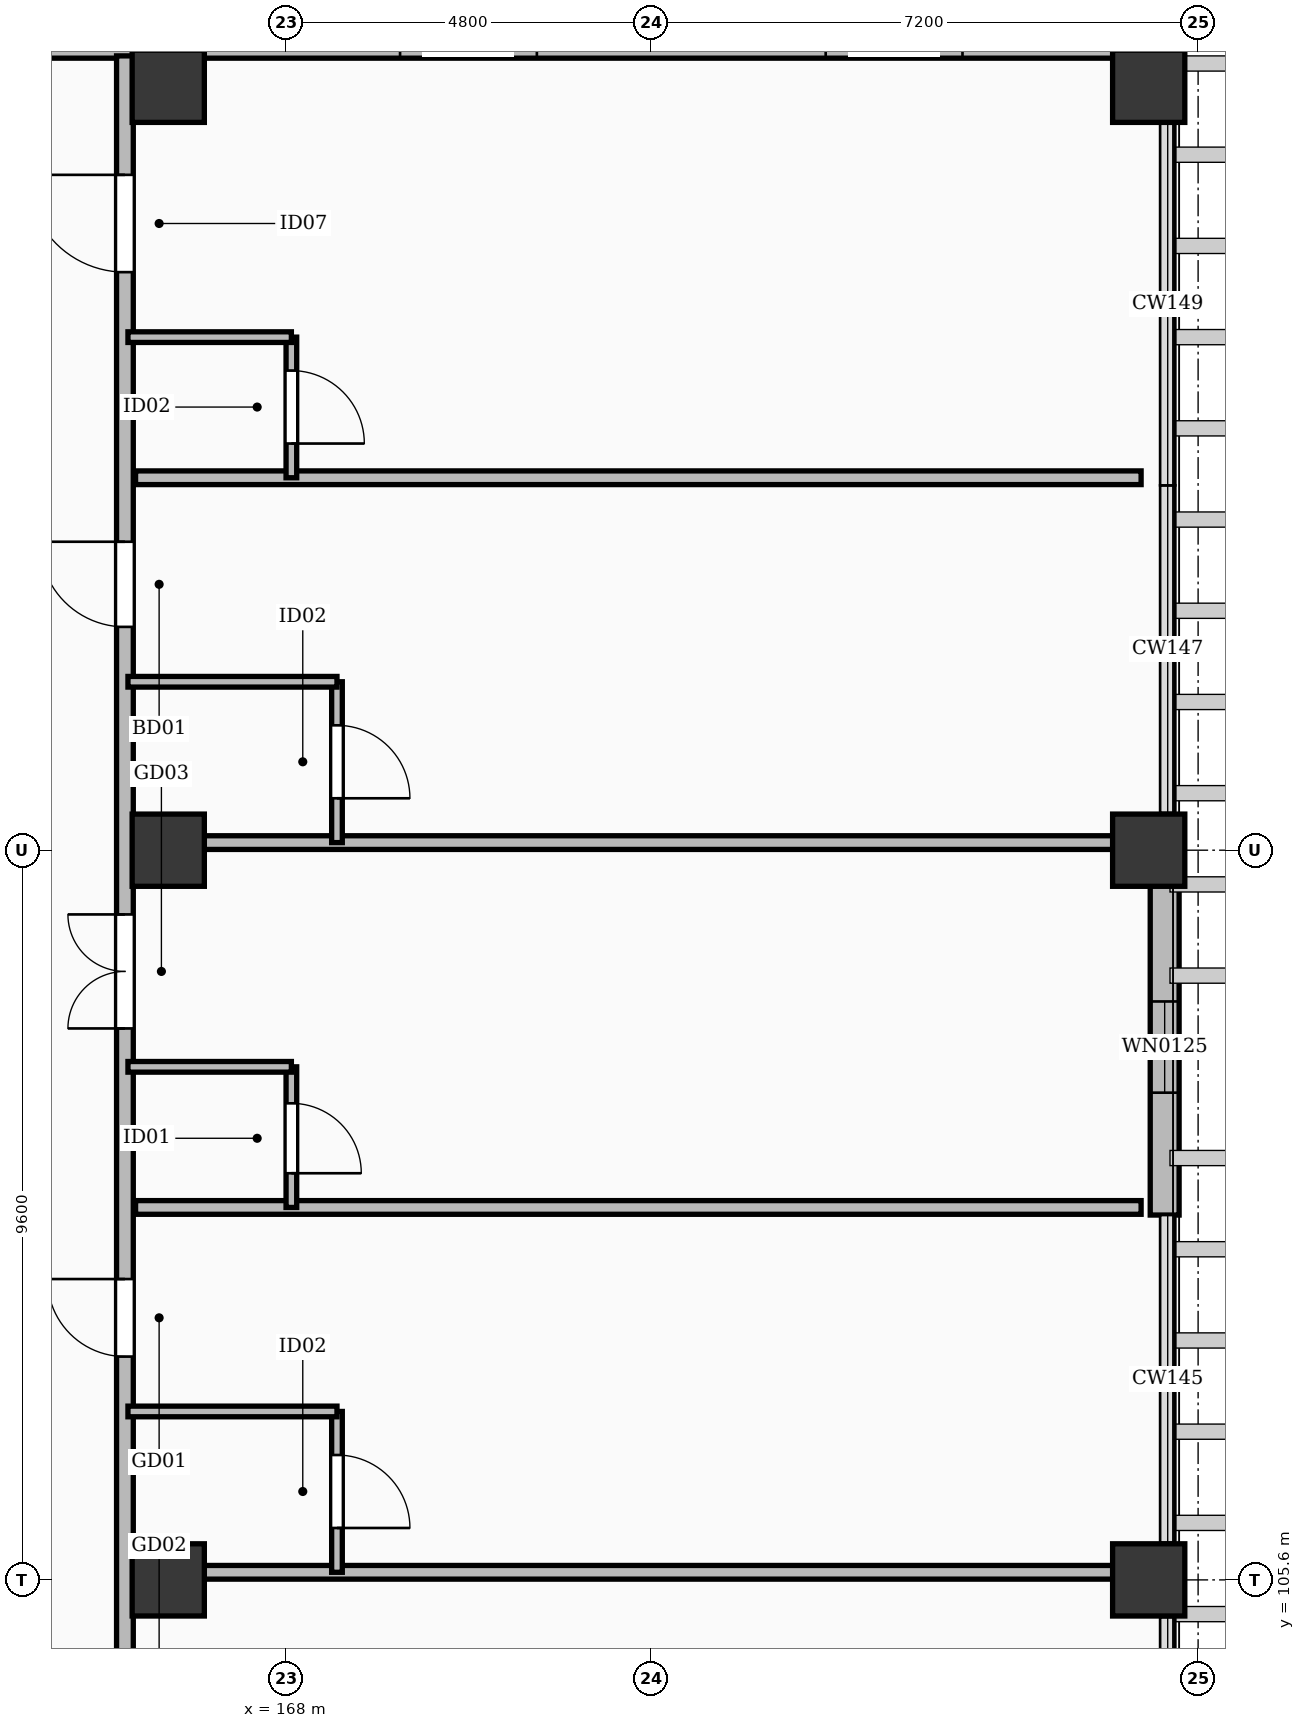
"""IFC4 building model, lengths in metres.
Left out: names, types, materials, properties, quantities, classifications, styles, units other than length and angle.
Written with IfcOpenShell. Run it as: python <this file> out.ifc"""

import sys

from ifc_helpers import new_model, si_unit, direction, frame, frame_2d, origin, origin_2d, place, context, subcontext, project, spatial, rectangle, extrude, element, fill, save


model = new_model("IFC4")
c1 = context("Model", 3, precision=1e-05, world=origin(), true_north=direction((0.0, 1.0)))
c2 = subcontext(c1, "Body", "Model", "MODEL_VIEW")
j1 = project(units=[si_unit("LENGTHUNIT", "METRE"), si_unit("PLANEANGLEUNIT", "RADIAN")], contexts=[c1])
p1 = place(None, origin())
s1 = spatial("IfcSite", under=j1, at=p1, CompositionType="ELEMENT")
p2 = place(p1, origin())
s2 = spatial("IfcBuilding", under=s1, at=p2, CompositionType="ELEMENT")
p3 = place(p2, frame((0.0, 0.0, 11.4)))
s3 = spatial("IfcBuildingStorey", under=s2, at=p3, CompositionType="ELEMENT", Elevation=11.4)
for number, where, z_axis, x_axis in (
    (1, (166.45, 105.6, 0.0), (0.0, 0.0, 1.0), (1.0, 0.0, 0.0)),
    (2, (166.45, 115.2, 0.0), (0.0, 0.0, 1.0), (1.0, 0.0, 0.0)),
    (3, (166.45, 125.25, 0.0), (0.0, 0.0, 1.0), (1.0, 0.0, 0.0)),
    (4, (179.35, 105.6, 0.0), (0.0, 0.0, 1.0), (1.0, 0.0, 0.0)),
    (5, (179.35, 115.2, 0.0), (0.0, 0.0, 1.0), (1.0, 0.0, 0.0)),
    (6, (179.35, 125.25, 0.0), (0.0, 0.0, 1.0), (1.0, 0.0, 0.0)),
):
    element("IfcColumn", number, at=place(p3, frame(where, z_axis=z_axis, x_axis=x_axis)), inside=s3, PredefinedType="COLUMN", context=c2, shape_type="SweptSolid", body=[
        extrude(rectangle(XDim=0.95, YDim=0.95, at=origin_2d()), origin(), (0.0, 0.0, 1.0), 4.8),
    ])
p4 = place(p3, frame((149.9, 125.81, 0.0), z_axis=(0.0, 0.0, 1.0), x_axis=(1.0, 0.0, 0.0)))
e7 = element("IfcWall", 7, at=p4, inside=s3, PredefinedType="SOLIDWALL", context=c2, shape_type="SweptSolid", body=[
    extrude(rectangle(XDim=29.0, YDim=0.38, at=frame_2d((14.5, 0.0))), origin(), (0.0, 0.0, 1.0), 4.42),
])
p5 = place(p4, frame((3.6, 0.0, 0.55)))
e8 = element("IfcOpeningElement", 8, at=p5, cuts=e7, PredefinedType="OPENING", context=c2, shape_type="SweptSolid", body=[
    extrude(rectangle(XDim=1.8, YDim=1.76, at=frame_2d((0.9, 0.88))), frame((0.0, 0.202, 0.0), z_axis=(0.0, -1.0, 0.0), x_axis=(1.0, 0.0, 0.0)), (0.0, 0.0, 1.0), 0.404),
])
p6 = place(p4, frame((9.2, 0.0, 0.55)))
e9 = element("IfcOpeningElement", 9, at=p6, cuts=e7, PredefinedType="OPENING", context=c2, shape_type="SweptSolid", body=[
    extrude(rectangle(XDim=1.8, YDim=1.76, at=frame_2d((0.9, 0.88))), frame((0.0, 0.202, 0.0), z_axis=(0.0, -1.0, 0.0), x_axis=(1.0, 0.0, 0.0)), (0.0, 0.0, 1.0), 0.404),
])
p7 = place(p4, frame((19.6, 0.0, 0.55)))
e10 = element("IfcOpeningElement", 10, at=p7, cuts=e7, PredefinedType="OPENING", context=c2, shape_type="SweptSolid", body=[
    extrude(rectangle(XDim=1.8, YDim=1.76, at=frame_2d((0.9, 0.88))), frame((0.0, 0.202, 0.0), z_axis=(0.0, -1.0, 0.0), x_axis=(1.0, 0.0, 0.0)), (0.0, 0.0, 1.0), 0.404),
])
p8 = place(p4, frame((25.2, 0.0, 0.55)))
e11 = element("IfcOpeningElement", 11, at=p8, cuts=e7, PredefinedType="OPENING", context=c2, shape_type="SweptSolid", body=[
    extrude(rectangle(XDim=1.8, YDim=1.76, at=frame_2d((0.9, 0.88))), frame((0.0, 0.202, 0.0), z_axis=(0.0, -1.0, 0.0), x_axis=(1.0, 0.0, 0.0)), (0.0, 0.0, 1.0), 0.404),
])
p9 = place(p3, frame((179.56, 114.75, 0.0), z_axis=(0.0, 0.0, 1.0), x_axis=(0.0, -1.0, 0.0)))
e12 = element("IfcWall", 12, at=p9, inside=s3, PredefinedType="SOLIDWALL", context=c2, shape_type="SweptSolid", body=[
    extrude(rectangle(XDim=4.35, YDim=0.38, at=frame_2d((2.175, 0.0))), origin(), (0.0, 0.0, 1.0), 3.662),
])
p10 = place(p9, frame((1.54, 0.0, 0.55)))
e13 = element("IfcOpeningElement", 13, at=p10, cuts=e12, PredefinedType="OPENING", context=c2, shape_type="SweptSolid", body=[
    extrude(rectangle(XDim=1.2, YDim=1.72, at=frame_2d((0.6, 0.86))), frame((0.0, 0.202, 0.0), z_axis=(0.0, -1.0, 0.0), x_axis=(1.0, 0.0, 0.0)), (0.0, 0.0, 1.0), 0.404),
])
p11 = place(p3, frame((165.88, 65.4, 0.0), z_axis=(0.0, 0.0, 1.0), x_axis=(0.0, 1.0, 0.0)))
e14 = element("IfcWall", 14, at=p11, inside=s3, PredefinedType="PARTITIONING", context=c2, shape_type="SweptSolid", body=[
    extrude(rectangle(XDim=60.25, YDim=0.22, at=frame_2d((30.125, 0.0))), origin(), (0.0, 0.0, 1.0), 3.662),
])
p12 = place(p11, frame((4.738, 0.0, 0.0)))
e15 = element("IfcOpeningElement", 15, at=p12, cuts=e14, PredefinedType="OPENING", context=c2, shape_type="SweptSolid", body=[
    extrude(rectangle(XDim=1.05, YDim=2.18, at=frame_2d((0.525, 1.09))), frame((0.0, 0.122, 0.0), z_axis=(0.0, -1.0, 0.0), x_axis=(1.0, 0.0, 0.0)), (0.0, 0.0, 1.0), 0.244),
])
p13 = place(p11, frame((9.405, 0.0, 0.0)))
e16 = element("IfcOpeningElement", 16, at=p13, cuts=e14, PredefinedType="OPENING", context=c2, shape_type="SweptSolid", body=[
    extrude(rectangle(XDim=1.08, YDim=2.25, at=frame_2d((0.54, 1.125))), frame((0.0, 0.122, 0.0), z_axis=(0.0, -1.0, 0.0), x_axis=(1.0, 0.0, 0.0)), (0.0, 0.0, 1.0), 0.244),
])
p14 = place(p11, frame((14.338, 0.0, 0.0)))
e17 = element("IfcOpeningElement", 17, at=p14, cuts=e14, PredefinedType="OPENING", context=c2, shape_type="SweptSolid", body=[
    extrude(rectangle(XDim=1.02, YDim=2.2, at=frame_2d((0.51, 1.1))), frame((0.0, 0.122, 0.0), z_axis=(0.0, -1.0, 0.0), x_axis=(1.0, 0.0, 0.0)), (0.0, 0.0, 1.0), 0.244),
])
p15 = place(p11, frame((18.655, 0.0, 0.0)))
e18 = element("IfcOpeningElement", 18, at=p15, cuts=e14, PredefinedType="OPENING", context=c2, shape_type="SweptSolid", body=[
    extrude(rectangle(XDim=1.5, YDim=2.3, at=frame_2d((0.75, 1.15))), frame((0.0, 0.122, 0.0), z_axis=(0.0, -1.0, 0.0), x_axis=(1.0, 0.0, 0.0)), (0.0, 0.0, 1.0), 0.244),
])
p16 = place(p11, frame((23.938, 0.0, 0.0)))
e19 = element("IfcOpeningElement", 19, at=p16, cuts=e14, PredefinedType="OPENING", context=c2, shape_type="SweptSolid", body=[
    extrude(rectangle(XDim=1.12, YDim=2.15, at=frame_2d((0.56, 1.075))), frame((0.0, 0.122, 0.0), z_axis=(0.0, -1.0, 0.0), x_axis=(1.0, 0.0, 0.0)), (0.0, 0.0, 1.0), 0.244),
])
p17 = place(p11, frame((28.605, 0.0, 0.0)))
e20 = element("IfcOpeningElement", 20, at=p17, cuts=e14, PredefinedType="OPENING", context=c2, shape_type="SweptSolid", body=[
    extrude(rectangle(XDim=1.28, YDim=2.16, at=frame_2d((0.64, 1.08))), frame((0.0, 0.122, 0.0), z_axis=(0.0, -1.0, 0.0), x_axis=(1.0, 0.0, 0.0)), (0.0, 0.0, 1.0), 0.244),
])
p18 = place(p11, frame((33.538, 0.0, 0.0)))
e21 = element("IfcOpeningElement", 21, at=p18, cuts=e14, PredefinedType="OPENING", context=c2, shape_type="SweptSolid", body=[
    extrude(rectangle(XDim=1.05, YDim=2.18, at=frame_2d((0.525, 1.09))), frame((0.0, 0.122, 0.0), z_axis=(0.0, -1.0, 0.0), x_axis=(1.0, 0.0, 0.0)), (0.0, 0.0, 1.0), 0.244),
])
p19 = place(p11, frame((38.205, 0.0, 0.0)))
e22 = element("IfcOpeningElement", 22, at=p19, cuts=e14, PredefinedType="OPENING", context=c2, shape_type="SweptSolid", body=[
    extrude(rectangle(XDim=1.08, YDim=2.25, at=frame_2d((0.54, 1.125))), frame((0.0, 0.122, 0.0), z_axis=(0.0, -1.0, 0.0), x_axis=(1.0, 0.0, 0.0)), (0.0, 0.0, 1.0), 0.244),
])
p20 = place(p11, frame((43.138, 0.0, 0.0)))
e23 = element("IfcOpeningElement", 23, at=p20, cuts=e14, PredefinedType="OPENING", context=c2, shape_type="SweptSolid", body=[
    extrude(rectangle(XDim=1.02, YDim=2.2, at=frame_2d((0.51, 1.1))), frame((0.0, 0.122, 0.0), z_axis=(0.0, -1.0, 0.0), x_axis=(1.0, 0.0, 0.0)), (0.0, 0.0, 1.0), 0.244),
])
p21 = place(p11, frame((47.455, 0.0, 0.0)))
e24 = element("IfcOpeningElement", 24, at=p21, cuts=e14, PredefinedType="OPENING", context=c2, shape_type="SweptSolid", body=[
    extrude(rectangle(XDim=1.5, YDim=2.3, at=frame_2d((0.75, 1.15))), frame((0.0, 0.122, 0.0), z_axis=(0.0, -1.0, 0.0), x_axis=(1.0, 0.0, 0.0)), (0.0, 0.0, 1.0), 0.244),
])
p22 = place(p11, frame((52.738, 0.0, 0.0)))
e25 = element("IfcOpeningElement", 25, at=p22, cuts=e14, PredefinedType="OPENING", context=c2, shape_type="SweptSolid", body=[
    extrude(rectangle(XDim=1.12, YDim=2.15, at=frame_2d((0.56, 1.075))), frame((0.0, 0.122, 0.0), z_axis=(0.0, -1.0, 0.0), x_axis=(1.0, 0.0, 0.0)), (0.0, 0.0, 1.0), 0.244),
])
p23 = place(p11, frame((57.405, 0.0, 0.0)))
e26 = element("IfcOpeningElement", 26, at=p23, cuts=e14, PredefinedType="OPENING", context=c2, shape_type="SweptSolid", body=[
    extrude(rectangle(XDim=1.28, YDim=2.16, at=frame_2d((0.64, 1.08))), frame((0.0, 0.122, 0.0), z_axis=(0.0, -1.0, 0.0), x_axis=(1.0, 0.0, 0.0)), (0.0, 0.0, 1.0), 0.244),
])
p24 = place(p3, frame((166.02, 105.7, 0.0), z_axis=(0.0, 0.0, 1.0), x_axis=(1.0, 0.0, 0.0)))
e27 = element("IfcWall", 27, at=p24, inside=s3, PredefinedType="PARTITIONING", context=c2, shape_type="SweptSolid", body=[
    extrude(rectangle(XDim=13.23, YDim=0.18, at=frame_2d((6.615, 0.0))), origin(), (0.0, 0.0, 1.0), 3.662),
])
p25 = place(p3, frame((168.67, 105.7, 0.0), z_axis=(0.0, 0.0, 1.0), x_axis=(0.0, 1.0, 0.0)))
e28 = element("IfcWall", 28, at=p25, inside=s3, PredefinedType="PARTITIONING", context=c2, shape_type="SweptSolid", body=[
    extrude(rectangle(XDim=2.116, YDim=0.14, at=frame_2d((1.058, 0.0))), origin(), (0.0, 0.0, 1.0), 3.692),
])
p26 = place(p25, frame((0.583, 0.0, 0.0)))
e29 = element("IfcOpeningElement", 29, at=p26, cuts=e28, PredefinedType="OPENING", context=c2, shape_type="SweptSolid", body=[
    extrude(rectangle(XDim=0.96, YDim=2.12, at=frame_2d((0.48, 1.06))), frame((0.0, 0.082, 0.0), z_axis=(0.0, -1.0, 0.0), x_axis=(1.0, 0.0, 0.0)), (0.0, 0.0, 1.0), 0.164),
])
p27 = place(p3, frame((165.92, 107.816, 0.0), z_axis=(0.0, 0.0, 1.0), x_axis=(1.0, 0.0, 0.0)))
e30 = element("IfcWall", 30, at=p27, inside=s3, PredefinedType="PARTITIONING", context=c2, shape_type="SweptSolid", body=[
    extrude(rectangle(XDim=2.75, YDim=0.14, at=frame_2d((1.375, 0.0))), origin(), (0.0, 0.0, 1.0), 3.692),
])
p28 = place(p3, frame((166.02, 110.5, 0.0), z_axis=(0.0, 0.0, 1.0), x_axis=(1.0, 0.0, 0.0)))
e31 = element("IfcWall", 31, at=p28, inside=s3, PredefinedType="PARTITIONING", context=c2, shape_type="SweptSolid", body=[
    extrude(rectangle(XDim=13.23, YDim=0.18, at=frame_2d((6.615, 0.0))), origin(), (0.0, 0.0, 1.0), 3.662),
])
p29 = place(p3, frame((168.07, 110.5, 0.0), z_axis=(0.0, 0.0, 1.0), x_axis=(0.0, 1.0, 0.0)))
e32 = element("IfcWall", 32, at=p29, inside=s3, PredefinedType="PARTITIONING", context=c2, shape_type="SweptSolid", body=[
    extrude(rectangle(XDim=1.85, YDim=0.14, at=frame_2d((0.925, 0.0))), origin(), (0.0, 0.0, 1.0), 4.42),
])
p30 = place(p29, frame((0.45, 0.0, 0.0)))
e33 = element("IfcOpeningElement", 33, at=p30, cuts=e32, PredefinedType="OPENING", context=c2, shape_type="SweptSolid", body=[
    extrude(rectangle(XDim=0.92, YDim=2.1, at=frame_2d((0.46, 1.05))), frame((0.0, 0.082, 0.0), z_axis=(0.0, -1.0, 0.0), x_axis=(1.0, 0.0, 0.0)), (0.0, 0.0, 1.0), 0.164),
])
p31 = place(p3, frame((165.92, 112.35, 0.0), z_axis=(0.0, 0.0, 1.0), x_axis=(1.0, 0.0, 0.0)))
e34 = element("IfcWall", 34, at=p31, inside=s3, PredefinedType="PARTITIONING", context=c2, shape_type="SweptSolid", body=[
    extrude(rectangle(XDim=2.15, YDim=0.14, at=frame_2d((1.075, 0.0))), origin(), (0.0, 0.0, 1.0), 3.692),
])
p32 = place(p3, frame((166.02, 115.3, 0.0), z_axis=(0.0, 0.0, 1.0), x_axis=(1.0, 0.0, 0.0)))
e35 = element("IfcWall", 35, at=p32, inside=s3, PredefinedType="PARTITIONING", context=c2, shape_type="SweptSolid", body=[
    extrude(rectangle(XDim=13.23, YDim=0.18, at=frame_2d((6.615, 0.0))), origin(), (0.0, 0.0, 1.0), 3.662),
])
p33 = place(p3, frame((168.67, 115.3, 0.0), z_axis=(0.0, 0.0, 1.0), x_axis=(0.0, 1.0, 0.0)))
e36 = element("IfcWall", 36, at=p33, inside=s3, PredefinedType="PARTITIONING", context=c2, shape_type="SweptSolid", body=[
    extrude(rectangle(XDim=2.116, YDim=0.14, at=frame_2d((1.058, 0.0))), origin(), (0.0, 0.0, 1.0), 3.692),
])
p34 = place(p33, frame((0.583, 0.0, 0.0)))
e37 = element("IfcOpeningElement", 37, at=p34, cuts=e36, PredefinedType="OPENING", context=c2, shape_type="SweptSolid", body=[
    extrude(rectangle(XDim=0.96, YDim=2.12, at=frame_2d((0.48, 1.06))), frame((0.0, 0.082, 0.0), z_axis=(0.0, -1.0, 0.0), x_axis=(1.0, 0.0, 0.0)), (0.0, 0.0, 1.0), 0.164),
])
p35 = place(p3, frame((165.92, 117.416, 0.0), z_axis=(0.0, 0.0, 1.0), x_axis=(1.0, 0.0, 0.0)))
e38 = element("IfcWall", 38, at=p35, inside=s3, PredefinedType="PARTITIONING", context=c2, shape_type="SweptSolid", body=[
    extrude(rectangle(XDim=2.75, YDim=0.14, at=frame_2d((1.375, 0.0))), origin(), (0.0, 0.0, 1.0), 3.692),
])
p36 = place(p3, frame((166.02, 120.1, 0.0), z_axis=(0.0, 0.0, 1.0), x_axis=(1.0, 0.0, 0.0)))
e39 = element("IfcWall", 39, at=p36, inside=s3, PredefinedType="PARTITIONING", context=c2, shape_type="SweptSolid", body=[
    extrude(rectangle(XDim=13.23, YDim=0.18, at=frame_2d((6.615, 0.0))), origin(), (0.0, 0.0, 1.0), 3.662),
])
p37 = place(p3, frame((168.07, 120.1, 0.0), z_axis=(0.0, 0.0, 1.0), x_axis=(0.0, 1.0, 0.0)))
e40 = element("IfcWall", 40, at=p37, inside=s3, PredefinedType="PARTITIONING", context=c2, shape_type="SweptSolid", body=[
    extrude(rectangle(XDim=1.85, YDim=0.14, at=frame_2d((0.925, 0.0))), origin(), (0.0, 0.0, 1.0), 4.42),
])
p38 = place(p37, frame((0.45, 0.0, 0.0)))
e41 = element("IfcOpeningElement", 41, at=p38, cuts=e40, PredefinedType="OPENING", context=c2, shape_type="SweptSolid", body=[
    extrude(rectangle(XDim=0.96, YDim=2.12, at=frame_2d((0.48, 1.06))), frame((0.0, 0.082, 0.0), z_axis=(0.0, -1.0, 0.0), x_axis=(1.0, 0.0, 0.0)), (0.0, 0.0, 1.0), 0.164),
])
p39 = place(p3, frame((165.92, 121.95, 0.0), z_axis=(0.0, 0.0, 1.0), x_axis=(1.0, 0.0, 0.0)))
e42 = element("IfcWall", 42, at=p39, inside=s3, PredefinedType="PARTITIONING", context=c2, shape_type="SweptSolid", body=[
    extrude(rectangle(XDim=2.15, YDim=0.14, at=frame_2d((1.075, 0.0))), origin(), (0.0, 0.0, 1.0), 3.692),
])
p40 = place(p10, origin())
e43 = element("IfcWindow", 43, at=p40, inside=s3, PartitioningType="SINGLE_PANEL", PredefinedType="WINDOW", context=c2, shape_type="SweptSolid", body=[
    extrude(rectangle(XDim=1.2, YDim=1.72, at=frame_2d((0.6, 0.86))), frame((0.0, 0.03, 0.0), z_axis=(0.0, -1.0, 0.0), x_axis=(1.0, 0.0, 0.0)), (0.0, 0.0, 1.0), 0.06),
])
fill(e13, e43)
p41 = place(p20, origin())
e44 = element("IfcDoor", 44, at=p41, inside=s3, OperationType="SINGLE_SWING_RIGHT", PredefinedType="DOOR", context=c2, shape_type="SweptSolid", body=[
    extrude(rectangle(XDim=1.02, YDim=2.2, at=frame_2d((0.51, 1.1))), frame((0.0, 0.025, 0.0), z_axis=(0.0, -1.0, 0.0), x_axis=(1.0, 0.0, 0.0)), (0.0, 0.0, 1.0), 0.05),
])
fill(e23, e44)
p42 = place(p26, frame((0.96, 0.0, 0.0), z_axis=(0.0, 0.0, 1.0), x_axis=(-1.0, 0.0, 0.0)))
e45 = element("IfcDoor", 45, at=p42, inside=s3, OperationType="SINGLE_SWING_LEFT", PredefinedType="DOOR", context=c2, shape_type="SweptSolid", body=[
    extrude(rectangle(XDim=0.96, YDim=2.12, at=frame_2d((0.48, 1.06))), frame((0.0, 0.025, 0.0), z_axis=(0.0, -1.0, 0.0), x_axis=(1.0, 0.0, 0.0)), (0.0, 0.0, 1.0), 0.05),
])
fill(e29, e45)
p43 = place(p21, origin())
e46 = element("IfcDoor", 46, at=p43, inside=s3, OperationType="DOUBLE_DOOR_SINGLE_SWING", PredefinedType="DOOR", context=c2, shape_type="SweptSolid", body=[
    extrude(rectangle(XDim=1.5, YDim=2.3, at=frame_2d((0.75, 1.15))), frame((0.0, 0.025, 0.0), z_axis=(0.0, -1.0, 0.0), x_axis=(1.0, 0.0, 0.0)), (0.0, 0.0, 1.0), 0.05),
])
fill(e24, e46)
p44 = place(p30, frame((0.92, 0.0, 0.0), z_axis=(0.0, 0.0, 1.0), x_axis=(-1.0, 0.0, 0.0)))
e47 = element("IfcDoor", 47, at=p44, inside=s3, OperationType="SINGLE_SWING_LEFT", PredefinedType="DOOR", context=c2, shape_type="SweptSolid", body=[
    extrude(rectangle(XDim=0.92, YDim=2.1, at=frame_2d((0.46, 1.05))), frame((0.0, 0.025, 0.0), z_axis=(0.0, -1.0, 0.0), x_axis=(1.0, 0.0, 0.0)), (0.0, 0.0, 1.0), 0.05),
])
fill(e33, e47)
p45 = place(p22, origin())
e48 = element("IfcDoor", 48, at=p45, inside=s3, OperationType="SINGLE_SWING_RIGHT", PredefinedType="DOOR", context=c2, shape_type="SweptSolid", body=[
    extrude(rectangle(XDim=1.12, YDim=2.15, at=frame_2d((0.56, 1.075))), frame((0.0, 0.025, 0.0), z_axis=(0.0, -1.0, 0.0), x_axis=(1.0, 0.0, 0.0)), (0.0, 0.0, 1.0), 0.05),
])
fill(e25, e48)
p46 = place(p34, frame((0.96, 0.0, 0.0), z_axis=(0.0, 0.0, 1.0), x_axis=(-1.0, 0.0, 0.0)))
e49 = element("IfcDoor", 49, at=p46, inside=s3, OperationType="SINGLE_SWING_LEFT", PredefinedType="DOOR", context=c2, shape_type="SweptSolid", body=[
    extrude(rectangle(XDim=0.96, YDim=2.12, at=frame_2d((0.48, 1.06))), frame((0.0, 0.025, 0.0), z_axis=(0.0, -1.0, 0.0), x_axis=(1.0, 0.0, 0.0)), (0.0, 0.0, 1.0), 0.05),
])
fill(e37, e49)
p47 = place(p23, origin())
e50 = element("IfcDoor", 50, at=p47, inside=s3, OperationType="SINGLE_SWING_RIGHT", PredefinedType="DOOR", context=c2, shape_type="SweptSolid", body=[
    extrude(rectangle(XDim=1.28, YDim=2.16, at=frame_2d((0.64, 1.08))), frame((0.0, 0.025, 0.0), z_axis=(0.0, -1.0, 0.0), x_axis=(1.0, 0.0, 0.0)), (0.0, 0.0, 1.0), 0.05),
])
fill(e26, e50)
p48 = place(p38, frame((0.96, 0.0, 0.0), z_axis=(0.0, 0.0, 1.0), x_axis=(-1.0, 0.0, 0.0)))
e51 = element("IfcDoor", 51, at=p48, inside=s3, OperationType="SINGLE_SWING_LEFT", PredefinedType="DOOR", context=c2, shape_type="SweptSolid", body=[
    extrude(rectangle(XDim=0.96, YDim=2.12, at=frame_2d((0.48, 1.06))), frame((0.0, 0.025, 0.0), z_axis=(0.0, -1.0, 0.0), x_axis=(1.0, 0.0, 0.0)), (0.0, 0.0, 1.0), 0.05),
])
fill(e41, e51)
save(model, sys.argv[1])
